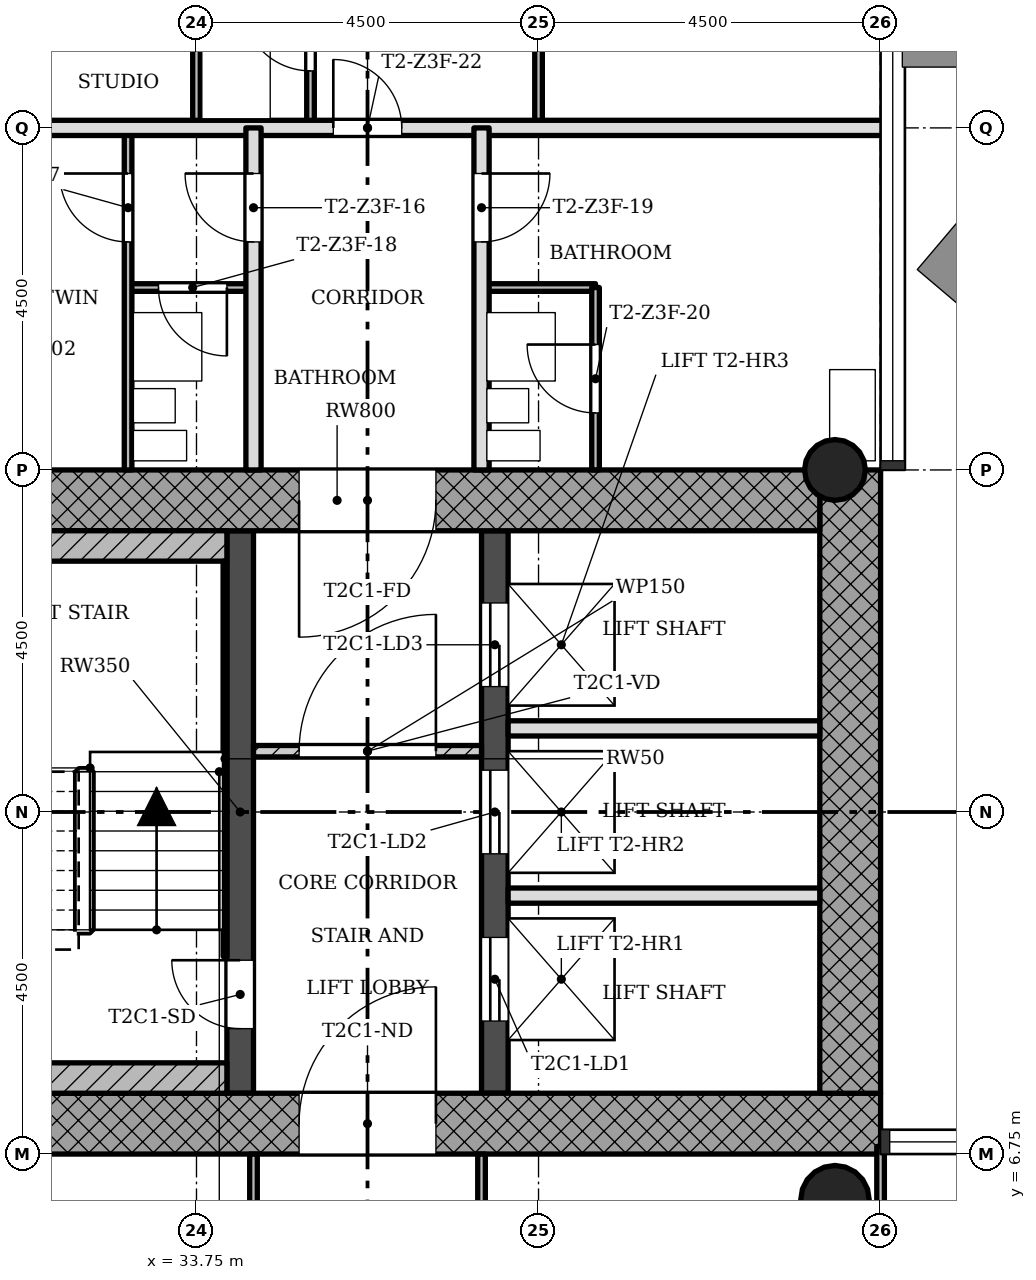
"""IFC4 building model, lengths in metres.
Left out: names, types, materials, properties, quantities, classifications, styles, units other than length and angle.
Written with IfcOpenShell. Run it as: python <this file> out.ifc"""

import sys

from ifc_helpers import new_model, si_unit, direction, frame, frame_2d, origin, origin_2d, place, context, subcontext, project, spatial, rectangle, hollow_circle, extrude, element, fill, save


model = new_model("IFC4")
c1 = context("Model", 3, precision=1e-05, world=origin(), true_north=direction((0.0, 1.0)))
c2 = subcontext(c1, "Body", "Model", "MODEL_VIEW")
j1 = project(units=[si_unit("LENGTHUNIT", "METRE"), si_unit("PLANEANGLEUNIT", "RADIAN")], contexts=[c1])
p1 = place(None, origin())
s1 = spatial("IfcSite", under=j1, at=p1, CompositionType="ELEMENT")
p2 = place(p1, origin())
s2 = spatial("IfcBuilding", under=s1, at=p2, CompositionType="ELEMENT")
p3 = place(p2, frame((0.0, 0.0, 171.1)))
s3 = spatial("IfcBuildingStorey", under=s2, at=p3, CompositionType="ELEMENT", Elevation=171.1)
p4 = place(p3, frame((30.05, 7.15, 0.0), z_axis=(0.0, 0.0, 1.0), x_axis=(1.0, 0.0, 0.0)))
e1 = element("IfcWall", 1, at=p4, inside=s3, PredefinedType="SHEAR", context=c2, shape_type="SweptSolid", body=[
    extrude(rectangle(XDim=12.7, YDim=0.8, at=frame_2d((6.35, 0.0))), origin(), (0.0, 0.0, 1.0), 3.4),
])
p5 = place(p4, frame((5.05, 0.0, 0.0)))
e2 = element("IfcOpeningElement", 2, at=p5, cuts=e1, PredefinedType="OPENING", context=c2, shape_type="SweptSolid", body=[
    extrude(rectangle(XDim=1.8, YDim=2.1, at=frame_2d((0.9, 1.05))), frame((0.0, 0.41, 0.0), z_axis=(0.0, -1.0, 0.0), x_axis=(1.0, 0.0, 0.0)), (0.0, 0.0, 1.0), 0.82),
])
p6 = place(p3, frame((42.35, 7.55, 0.0), z_axis=(0.0, 0.0, 1.0), x_axis=(0.0, 1.0, 0.0)))
e3 = element("IfcWall", 3, at=p6, inside=s3, PredefinedType="SHEAR", context=c2, shape_type="SweptSolid", body=[
    extrude(rectangle(XDim=8.2, YDim=0.8, at=frame_2d((4.1, 0.0))), origin(), (0.0, 0.0, 1.0), 3.4),
])
p7 = place(p3, frame((41.95, 15.35, 0.0), z_axis=(0.0, 0.0, 1.0), x_axis=(-1.0, 0.0, 0.0)))
e4 = element("IfcWall", 4, at=p7, inside=s3, PredefinedType="SHEAR", context=c2, shape_type="SweptSolid", body=[
    extrude(rectangle(XDim=12.7, YDim=0.8, at=frame_2d((6.35, 0.0))), origin(), (0.0, 0.0, 1.0), 3.4),
])
p8 = place(p7, frame((5.05, 0.0, 0.0)))
e5 = element("IfcOpeningElement", 5, at=p8, cuts=e4, PredefinedType="OPENING", context=c2, shape_type="SweptSolid", body=[
    extrude(rectangle(XDim=1.8, YDim=2.1, at=frame_2d((0.9, 1.05))), frame((0.0, 0.41, 0.0), z_axis=(0.0, -1.0, 0.0), x_axis=(1.0, 0.0, 0.0)), (0.0, 0.0, 1.0), 0.82),
])
p9 = place(p3, frame((34.325, 7.55, 0.0), z_axis=(0.0, 0.0, 1.0), x_axis=(0.0, 1.0, 0.0)))
e6 = element("IfcWall", 6, at=p9, inside=s3, PredefinedType="SHEAR", context=c2, shape_type="SweptSolid", body=[
    extrude(rectangle(XDim=7.4, YDim=0.35, at=frame_2d((3.7, 0.0))), origin(), (0.0, 0.0, 1.0), 3.4),
])
p10 = place(p9, frame((0.85, 0.0, 0.0)))
e7 = element("IfcOpeningElement", 7, at=p10, cuts=e6, PredefinedType="OPENING", context=c2, shape_type="SweptSolid", body=[
    extrude(rectangle(XDim=0.9, YDim=2.1, at=frame_2d((0.45, 1.05))), frame((0.0, 0.185, 0.0), z_axis=(0.0, -1.0, 0.0), x_axis=(1.0, 0.0, 0.0)), (0.0, 0.0, 1.0), 0.37),
])
p11 = place(p3, frame((37.675, 7.55, 0.0), z_axis=(0.0, 0.0, 1.0), x_axis=(0.0, 1.0, 0.0)))
e8 = element("IfcWall", 8, at=p11, inside=s3, PredefinedType="SHEAR", context=c2, shape_type="SweptSolid", body=[
    extrude(rectangle(XDim=7.4, YDim=0.35, at=frame_2d((3.7, 0.0))), origin(), (0.0, 0.0, 1.0), 3.4),
])
p12 = place(p11, frame((0.95, 0.0, 0.0)))
e9 = element("IfcOpeningElement", 9, at=p12, cuts=e8, PredefinedType="OPENING", context=c2, shape_type="SweptSolid", body=[
    extrude(rectangle(XDim=1.1, YDim=2.1, at=frame_2d((0.55, 1.05))), frame((0.0, 0.185, 0.0), z_axis=(0.0, -1.0, 0.0), x_axis=(1.0, 0.0, 0.0)), (0.0, 0.0, 1.0), 0.37),
])
p13 = place(p11, frame((3.15, 0.0, 0.0)))
e10 = element("IfcOpeningElement", 10, at=p13, cuts=e8, PredefinedType="OPENING", context=c2, shape_type="SweptSolid", body=[
    extrude(rectangle(XDim=1.1, YDim=2.1, at=frame_2d((0.55, 1.05))), frame((0.0, 0.185, 0.0), z_axis=(0.0, -1.0, 0.0), x_axis=(1.0, 0.0, 0.0)), (0.0, 0.0, 1.0), 0.37),
])
p14 = place(p11, frame((5.35, 0.0, 0.0)))
e11 = element("IfcOpeningElement", 11, at=p14, cuts=e8, PredefinedType="OPENING", context=c2, shape_type="SweptSolid", body=[
    extrude(rectangle(XDim=1.1, YDim=2.1, at=frame_2d((0.55, 1.05))), frame((0.0, 0.185, 0.0), z_axis=(0.0, -1.0, 0.0), x_axis=(1.0, 0.0, 0.0)), (0.0, 0.0, 1.0), 0.37),
])
p15 = place(p3, frame((42.15, 15.75, 0.0), z_axis=(0.0, 0.0, 1.0), x_axis=(1.0, 0.0, 0.0)))
e12 = element("IfcColumn", 12, at=p15, inside=s3, PredefinedType="COLUMN", context=c2, shape_type="SweptSolid", body=[
    extrude(hollow_circle(Radius=0.4, WallThickness=0.028, at=origin_2d()), origin(), (0.0, 0.0, 1.0), 3.4),
])
p16 = place(p3, frame((42.15, 6.15, 0.0), z_axis=(0.0, 0.0, 1.0), x_axis=(1.0, 0.0, 0.0)))
e13 = element("IfcColumn", 13, at=p16, inside=s3, PredefinedType="COLUMN", context=c2, shape_type="SweptSolid", body=[
    extrude(hollow_circle(Radius=0.45, WallThickness=0.032, at=origin_2d()), origin(), (0.0, 0.0, 1.0), 3.4),
])
p17 = place(p3, frame((37.5, 12.05, 0.0), z_axis=(0.0, 0.0, 1.0), x_axis=(-1.0, 0.0, 0.0)))
e14 = element("IfcWall", 14, at=p17, inside=s3, PredefinedType="PARTITIONING", context=c2, shape_type="SweptSolid", body=[
    extrude(rectangle(XDim=3.0, YDim=0.15, at=frame_2d((1.5, 0.0))), origin(), (0.0, 0.0, 1.0), 3.0),
])
p18 = place(p17, frame((0.6, 0.0, 0.0)))
e15 = element("IfcOpeningElement", 15, at=p18, cuts=e14, PredefinedType="OPENING", context=c2, shape_type="SweptSolid", body=[
    extrude(rectangle(XDim=1.8, YDim=2.1, at=frame_2d((0.9, 1.05))), frame((0.0, 0.085, 0.0), z_axis=(0.0, -1.0, 0.0), x_axis=(1.0, 0.0, 0.0)), (0.0, 0.0, 1.0), 0.17),
])
for number, where, z_axis, x_axis in (
    (16, (41.95, 10.15, 0.0), (0.0, 0.0, 1.0), (-1.0, 0.0, 0.0)),
    (17, (41.95, 12.35, 0.0), (0.0, 0.0, 1.0), (-1.0, 0.0, 0.0)),
):
    element("IfcWall", number, at=place(p3, frame(where, z_axis=z_axis, x_axis=x_axis)), inside=s3, PredefinedType="SOLIDWALL", context=c2, shape_type="SweptSolid", body=[
        extrude(rectangle(XDim=4.1, YDim=0.2, at=frame_2d((2.05, 0.0))), origin(), (0.0, 0.0, 1.0), 3.0),
    ])
p19 = place(p3, frame((39.0, 18.15, 0.0), z_axis=(0.0, 0.0, 1.0), x_axis=(-1.0, 0.0, 0.0)))
e18 = element("IfcWall", 18, at=p19, inside=s3, PredefinedType="PARTITIONING", context=c2, shape_type="SweptSolid", body=[
    extrude(rectangle(XDim=1.5, YDim=0.1, at=frame_2d((0.75, 0.0))), origin(), (0.0, 0.0, 1.0), 3.0),
])
p20 = place(p3, frame((34.5, 18.15, 0.0), z_axis=(0.0, 0.0, 1.0), x_axis=(-1.0, 0.0, 0.0)))
e19 = element("IfcWall", 19, at=p20, inside=s3, PredefinedType="PARTITIONING", context=c2, shape_type="SweptSolid", body=[
    extrude(rectangle(XDim=1.65, YDim=0.1, at=frame_2d((0.825, 0.0))), origin(), (0.0, 0.0, 1.0), 3.0),
])
p21 = place(p20, frame((0.35, 0.0, 0.0)))
e20 = element("IfcOpeningElement", 20, at=p21, cuts=e19, PredefinedType="OPENING", context=c2, shape_type="SweptSolid", body=[
    extrude(rectangle(XDim=0.9, YDim=2.1, at=frame_2d((0.45, 1.05))), frame((0.0, 0.06, 0.0), z_axis=(0.0, -1.0, 0.0), x_axis=(1.0, 0.0, 0.0)), (0.0, 0.0, 1.0), 0.12),
])
p22 = place(p3, frame((42.85, 20.25, 0.0), z_axis=(0.0, 0.0, 1.0), x_axis=(-1.0, 0.0, 0.0)))
e21 = element("IfcWall", 21, at=p22, inside=s3, PredefinedType="SOLIDWALL", context=c2, shape_type="SweptSolid", body=[
    extrude(rectangle(XDim=13.7, YDim=0.2, at=frame_2d((6.85, 0.0))), origin(), (0.0, 0.0, 1.0), 3.0),
])
p23 = place(p22, frame((6.4, 0.0, 0.0)))
e22 = element("IfcOpeningElement", 22, at=p23, cuts=e21, PredefinedType="OPENING", context=c2, shape_type="SweptSolid", body=[
    extrude(rectangle(XDim=0.9, YDim=2.1, at=frame_2d((0.45, 1.05))), frame((0.0, 0.11, 0.0), z_axis=(0.0, -1.0, 0.0), x_axis=(1.0, 0.0, 0.0)), (0.0, 0.0, 1.0), 0.22),
])
p24 = place(p3, frame((42.75, 0.9, 0.0), z_axis=(0.0, 0.0, 1.0), x_axis=(0.0, 1.0, 0.0)))
e23 = element("IfcWall", 23, at=p24, inside=s3, PredefinedType="PARTITIONING", context=c2, shape_type="SweptSolid", body=[
    extrude(rectangle(XDim=5.95, YDim=0.1, at=frame_2d((2.975, 0.0))), origin(), (0.0, 0.0, 1.0), 3.0),
])
p25 = place(p3, frame((39.0, 15.75, 0.0), z_axis=(0.0, 0.0, 1.0), x_axis=(0.0, 1.0, 0.0)))
e24 = element("IfcWall", 24, at=p25, inside=s3, PredefinedType="PARTITIONING", context=c2, shape_type="SweptSolid", body=[
    extrude(rectangle(XDim=2.4, YDim=0.1, at=frame_2d((1.2, 0.0))), origin(), (0.0, 0.0, 1.0), 3.0),
])
p26 = place(p25, frame((0.75, 0.0, 0.0)))
e25 = element("IfcOpeningElement", 25, at=p26, cuts=e24, PredefinedType="OPENING", context=c2, shape_type="SweptSolid", body=[
    extrude(rectangle(XDim=0.9, YDim=2.1, at=frame_2d((0.45, 1.05))), frame((0.0, 0.06, 0.0), z_axis=(0.0, -1.0, 0.0), x_axis=(1.0, 0.0, 0.0)), (0.0, 0.0, 1.0), 0.12),
])
p27 = place(p3, frame((38.25, 20.25, 0.0), z_axis=(0.0, 0.0, 1.0), x_axis=(0.0, 1.0, 0.0)))
e26 = element("IfcWall", 26, at=p27, inside=s3, PredefinedType="PARTITIONING", context=c2, shape_type="SweptSolid", body=[
    extrude(rectangle(XDim=4.6, YDim=0.1, at=frame_2d((2.3, 0.0))), origin(), (0.0, 0.0, 1.0), 3.0),
])
p28 = place(p27, frame((1.8, 0.0, 0.0)))
e27 = element("IfcOpeningElement", 27, at=p28, cuts=e26, PredefinedType="OPENING", context=c2, shape_type="SweptSolid", body=[
    extrude(rectangle(XDim=0.9, YDim=2.1, at=frame_2d((0.45, 1.05))), frame((0.0, 0.06, 0.0), z_axis=(0.0, -1.0, 0.0), x_axis=(1.0, 0.0, 0.0)), (0.0, 0.0, 1.0), 0.12),
])
p29 = place(p3, frame((37.5, 4.5, 0.0), z_axis=(0.0, 0.0, 1.0), x_axis=(0.0, 1.0, 0.0)))
e28 = element("IfcWall", 28, at=p29, inside=s3, PredefinedType="PARTITIONING", context=c2, shape_type="SweptSolid", body=[
    extrude(rectangle(XDim=2.25, YDim=0.1, at=frame_2d((1.125, 0.0))), origin(), (0.0, 0.0, 1.0), 3.0),
])
p30 = place(p3, frame((37.5, 15.75, 0.0), z_axis=(0.0, 0.0, 1.0), x_axis=(0.0, 1.0, 0.0)))
e29 = element("IfcWall", 29, at=p30, inside=s3, PredefinedType="SOLIDWALL", context=c2, shape_type="SweptSolid", body=[
    extrude(rectangle(XDim=4.5, YDim=0.2, at=frame_2d((2.25, 0.0))), origin(), (0.0, 0.0, 1.0), 3.0),
])
p31 = place(p30, frame((3.0, 0.0, 0.0)))
e30 = element("IfcOpeningElement", 30, at=p31, cuts=e29, PredefinedType="OPENING", context=c2, shape_type="SweptSolid", body=[
    extrude(rectangle(XDim=0.9, YDim=2.1, at=frame_2d((0.45, 1.05))), frame((0.0, 0.11, 0.0), z_axis=(0.0, -1.0, 0.0), x_axis=(1.0, 0.0, 0.0)), (0.0, 0.0, 1.0), 0.22),
])
p32 = place(p3, frame((35.25, 20.25, 0.0), z_axis=(0.0, 0.0, 1.0), x_axis=(0.0, 1.0, 0.0)))
e31 = element("IfcWall", 31, at=p32, inside=s3, PredefinedType="PARTITIONING", context=c2, shape_type="SweptSolid", body=[
    extrude(rectangle(XDim=2.4, YDim=0.1, at=frame_2d((1.2, 0.0))), origin(), (0.0, 0.0, 1.0), 3.0),
])
p33 = place(p32, frame((0.75, 0.0, 0.0)))
e32 = element("IfcOpeningElement", 32, at=p33, cuts=e31, PredefinedType="OPENING", context=c2, shape_type="SweptSolid", body=[
    extrude(rectangle(XDim=0.9, YDim=2.1, at=frame_2d((0.45, 1.05))), frame((0.0, 0.06, 0.0), z_axis=(0.0, -1.0, 0.0), x_axis=(1.0, 0.0, 0.0)), (0.0, 0.0, 1.0), 0.12),
])
p34 = place(p3, frame((34.5, 4.5, 0.0), z_axis=(0.0, 0.0, 1.0), x_axis=(0.0, 1.0, 0.0)))
e33 = element("IfcWall", 33, at=p34, inside=s3, PredefinedType="PARTITIONING", context=c2, shape_type="SweptSolid", body=[
    extrude(rectangle(XDim=2.25, YDim=0.1, at=frame_2d((1.125, 0.0))), origin(), (0.0, 0.0, 1.0), 3.0),
])
p35 = place(p3, frame((34.5, 15.75, 0.0), z_axis=(0.0, 0.0, 1.0), x_axis=(0.0, 1.0, 0.0)))
e34 = element("IfcWall", 34, at=p35, inside=s3, PredefinedType="SOLIDWALL", context=c2, shape_type="SweptSolid", body=[
    extrude(rectangle(XDim=4.5, YDim=0.2, at=frame_2d((2.25, 0.0))), origin(), (0.0, 0.0, 1.0), 3.0),
])
p36 = place(p35, frame((3.0, 0.0, 0.0)))
e35 = element("IfcOpeningElement", 35, at=p36, cuts=e34, PredefinedType="OPENING", context=c2, shape_type="SweptSolid", body=[
    extrude(rectangle(XDim=0.9, YDim=2.1, at=frame_2d((0.45, 1.05))), frame((0.0, 0.11, 0.0), z_axis=(0.0, -1.0, 0.0), x_axis=(1.0, 0.0, 0.0)), (0.0, 0.0, 1.0), 0.22),
])
p37 = place(p3, frame((33.75, 20.25, 0.0), z_axis=(0.0, 0.0, 1.0), x_axis=(0.0, 1.0, 0.0)))
e36 = element("IfcWall", 36, at=p37, inside=s3, PredefinedType="PARTITIONING", context=c2, shape_type="SweptSolid", body=[
    extrude(rectangle(XDim=4.6, YDim=0.1, at=frame_2d((2.3, 0.0))), origin(), (0.0, 0.0, 1.0), 3.0),
])
p38 = place(p37, frame((2.45, 0.0, 0.0)))
e37 = element("IfcOpeningElement", 37, at=p38, cuts=e36, PredefinedType="OPENING", context=c2, shape_type="SweptSolid", body=[
    extrude(rectangle(XDim=0.9, YDim=2.1, at=frame_2d((0.45, 1.05))), frame((0.0, 0.06, 0.0), z_axis=(0.0, -1.0, 0.0), x_axis=(1.0, 0.0, 0.0)), (0.0, 0.0, 1.0), 0.12),
])
p39 = place(p3, frame((32.85, 15.75, 0.0), z_axis=(0.0, 0.0, 1.0), x_axis=(0.0, 1.0, 0.0)))
e38 = element("IfcWall", 38, at=p39, inside=s3, PredefinedType="PARTITIONING", context=c2, shape_type="SweptSolid", body=[
    extrude(rectangle(XDim=4.5, YDim=0.1, at=frame_2d((2.25, 0.0))), origin(), (0.0, 0.0, 1.0), 3.0),
])
p40 = place(p39, frame((3.0, 0.0, 0.0)))
e39 = element("IfcOpeningElement", 39, at=p40, cuts=e38, PredefinedType="OPENING", context=c2, shape_type="SweptSolid", body=[
    extrude(rectangle(XDim=0.9, YDim=2.1, at=frame_2d((0.45, 1.05))), frame((0.0, 0.06, 0.0), z_axis=(0.0, -1.0, 0.0), x_axis=(1.0, 0.0, 0.0)), (0.0, 0.0, 1.0), 0.12),
])
for number, where, z_axis, x_axis in (
    (40, (34.15, 14.75, 0.0), (0.0, 0.0, 1.0), (-1.0, 0.0, 0.0)),
    (41, (34.15, 7.75, 0.0), (0.0, 0.0, 1.0), (-1.0, 0.0, 0.0)),
):
    element("IfcWall", number, at=place(p3, frame(where, z_axis=z_axis, x_axis=x_axis)), inside=s3, PredefinedType="SHEAR", context=c2, shape_type="SweptSolid", body=[
        extrude(rectangle(XDim=4.1, YDim=0.4, at=frame_2d((2.05, 0.0))), origin(), (0.0, 0.0, 1.0), 3.4),
    ])
p41 = place(p3, frame((34.125, 9.35, 0.0), z_axis=(0.0, 0.0, 1.0), x_axis=(0.0, 1.0, 0.0)))
e42 = element("IfcWall", 42, at=p41, inside=s3, PredefinedType="SHEAR", context=c2, shape_type="SweptSolid", body=[
    extrude(rectangle(XDim=5.2, YDim=0.05, at=frame_2d((2.6, 0.0))), origin(), (0.0, 0.0, 1.0), 3.4),
])
p42 = place(p18, origin())
e43 = element("IfcDoor", 43, at=p42, inside=s3, OperationType="SINGLE_SWING_LEFT", PredefinedType="DOOR", context=c2, shape_type="SweptSolid", body=[
    extrude(rectangle(XDim=1.8, YDim=2.1, at=frame_2d((0.9, 1.05))), frame((0.0, 0.025, 0.0), z_axis=(0.0, -1.0, 0.0), x_axis=(1.0, 0.0, 0.0)), (0.0, 0.0, 1.0), 0.05),
])
fill(e15, e43)
p43 = place(p36, origin())
e44 = element("IfcDoor", 44, at=p43, inside=s3, OperationType="SINGLE_SWING_LEFT", PredefinedType="DOOR", context=c2, shape_type="SweptSolid", body=[
    extrude(rectangle(XDim=0.9, YDim=2.1, at=frame_2d((0.45, 1.05))), frame((0.0, 0.025, 0.0), z_axis=(0.0, -1.0, 0.0), x_axis=(1.0, 0.0, 0.0)), (0.0, 0.0, 1.0), 0.05),
])
fill(e35, e44)
p44 = place(p40, origin())
e45 = element("IfcDoor", 45, at=p44, inside=s3, OperationType="SINGLE_SWING_LEFT", PredefinedType="DOOR", context=c2, shape_type="SweptSolid", body=[
    extrude(rectangle(XDim=0.9, YDim=2.1, at=frame_2d((0.45, 1.05))), frame((0.0, 0.025, 0.0), z_axis=(0.0, -1.0, 0.0), x_axis=(1.0, 0.0, 0.0)), (0.0, 0.0, 1.0), 0.05),
])
fill(e39, e45)
p45 = place(p21, origin())
e46 = element("IfcDoor", 46, at=p45, inside=s3, OperationType="SINGLE_SWING_RIGHT", PredefinedType="DOOR", context=c2, shape_type="SweptSolid", body=[
    extrude(rectangle(XDim=0.9, YDim=2.1, at=frame_2d((0.45, 1.05))), frame((0.0, 0.025, 0.0), z_axis=(0.0, -1.0, 0.0), x_axis=(1.0, 0.0, 0.0)), (0.0, 0.0, 1.0), 0.05),
])
fill(e20, e46)
p46 = place(p31, origin())
e47 = element("IfcDoor", 47, at=p46, inside=s3, OperationType="SINGLE_SWING_RIGHT", PredefinedType="DOOR", context=c2, shape_type="SweptSolid", body=[
    extrude(rectangle(XDim=0.9, YDim=2.1, at=frame_2d((0.45, 1.05))), frame((0.0, 0.025, 0.0), z_axis=(0.0, -1.0, 0.0), x_axis=(1.0, 0.0, 0.0)), (0.0, 0.0, 1.0), 0.05),
])
fill(e30, e47)
p47 = place(p26, origin())
e48 = element("IfcDoor", 48, at=p47, inside=s3, OperationType="SINGLE_SWING_LEFT", PredefinedType="DOOR", context=c2, shape_type="SweptSolid", body=[
    extrude(rectangle(XDim=0.9, YDim=2.1, at=frame_2d((0.45, 1.05))), frame((0.0, 0.025, 0.0), z_axis=(0.0, -1.0, 0.0), x_axis=(1.0, 0.0, 0.0)), (0.0, 0.0, 1.0), 0.05),
])
fill(e25, e48)
p48 = place(p33, origin())
e49 = element("IfcDoor", 49, at=p48, inside=s3, OperationType="SINGLE_SWING_LEFT", PredefinedType="DOOR", context=c2, shape_type="SweptSolid", body=[
    extrude(rectangle(XDim=0.9, YDim=2.1, at=frame_2d((0.45, 1.05))), frame((0.0, 0.025, 0.0), z_axis=(0.0, -1.0, 0.0), x_axis=(1.0, 0.0, 0.0)), (0.0, 0.0, 1.0), 0.05),
])
fill(e32, e49)
p49 = place(p23, origin())
e50 = element("IfcDoor", 50, at=p49, inside=s3, OperationType="SINGLE_SWING_RIGHT", PredefinedType="DOOR", context=c2, shape_type="SweptSolid", body=[
    extrude(rectangle(XDim=0.9, YDim=2.1, at=frame_2d((0.45, 1.05))), frame((0.0, 0.025, 0.0), z_axis=(0.0, -1.0, 0.0), x_axis=(1.0, 0.0, 0.0)), (0.0, 0.0, 1.0), 0.05),
])
fill(e22, e50)
p50 = place(p10, origin())
e51 = element("IfcDoor", 51, at=p50, inside=s3, OperationType="SINGLE_SWING_LEFT", PredefinedType="DOOR", context=c2, shape_type="SweptSolid", body=[
    extrude(rectangle(XDim=0.9, YDim=2.1, at=frame_2d((0.45, 1.05))), frame((0.0, 0.025, 0.0), z_axis=(0.0, -1.0, 0.0), x_axis=(1.0, 0.0, 0.0)), (0.0, 0.0, 1.0), 0.05),
])
fill(e7, e51)
p51 = place(p12, origin())
e52 = element("IfcDoor", 52, at=p51, inside=s3, OperationType="SLIDING_TO_LEFT", PredefinedType="DOOR", context=c2, shape_type="SweptSolid", body=[
    extrude(rectangle(XDim=1.1, YDim=2.1, at=frame_2d((0.55, 1.05))), frame((0.0, 0.025, 0.0), z_axis=(0.0, -1.0, 0.0), x_axis=(1.0, 0.0, 0.0)), (0.0, 0.0, 1.0), 0.05),
])
fill(e9, e52)
p52 = place(p13, origin())
e53 = element("IfcDoor", 53, at=p52, inside=s3, OperationType="SLIDING_TO_LEFT", PredefinedType="DOOR", context=c2, shape_type="SweptSolid", body=[
    extrude(rectangle(XDim=1.1, YDim=2.1, at=frame_2d((0.55, 1.05))), frame((0.0, 0.025, 0.0), z_axis=(0.0, -1.0, 0.0), x_axis=(1.0, 0.0, 0.0)), (0.0, 0.0, 1.0), 0.05),
])
fill(e10, e53)
p53 = place(p14, origin())
e54 = element("IfcDoor", 54, at=p53, inside=s3, OperationType="SLIDING_TO_LEFT", PredefinedType="DOOR", context=c2, shape_type="SweptSolid", body=[
    extrude(rectangle(XDim=1.1, YDim=2.1, at=frame_2d((0.55, 1.05))), frame((0.0, 0.025, 0.0), z_axis=(0.0, -1.0, 0.0), x_axis=(1.0, 0.0, 0.0)), (0.0, 0.0, 1.0), 0.05),
])
fill(e11, e54)
p54 = place(p5, origin())
e55 = element("IfcDoor", 55, at=p54, inside=s3, OperationType="SINGLE_SWING_LEFT", PredefinedType="DOOR", context=c2, shape_type="SweptSolid", body=[
    extrude(rectangle(XDim=1.8, YDim=2.1, at=frame_2d((0.9, 1.05))), frame((0.0, 0.025, 0.0), z_axis=(0.0, -1.0, 0.0), x_axis=(1.0, 0.0, 0.0)), (0.0, 0.0, 1.0), 0.05),
])
fill(e2, e55)
p55 = place(p8, origin())
e56 = element("IfcDoor", 56, at=p55, inside=s3, OperationType="SINGLE_SWING_LEFT", PredefinedType="DOOR", context=c2, shape_type="SweptSolid", body=[
    extrude(rectangle(XDim=1.8, YDim=2.1, at=frame_2d((0.9, 1.05))), frame((0.0, 0.025, 0.0), z_axis=(0.0, -1.0, 0.0), x_axis=(1.0, 0.0, 0.0)), (0.0, 0.0, 1.0), 0.05),
])
fill(e5, e56)
save(model, sys.argv[1])
